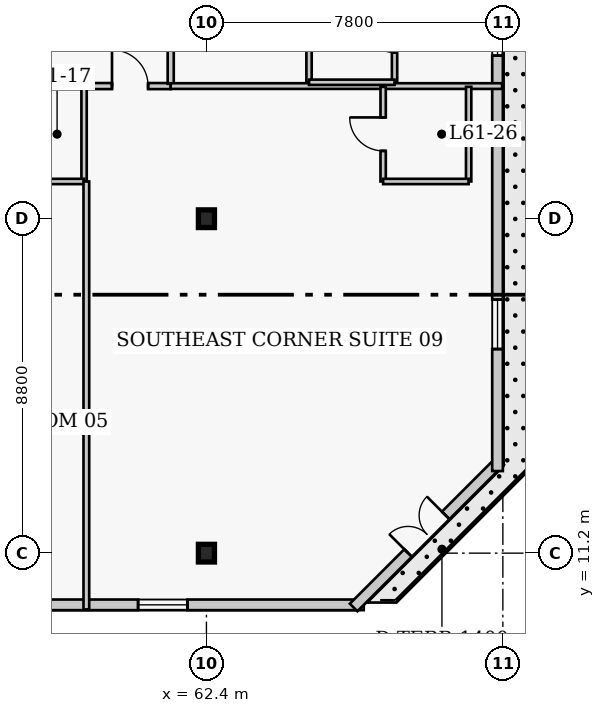
"""IFC4 building model, lengths in metres.
Left out: names, types, materials, properties, quantities, classifications, styles, units other than length and angle.
Written with IfcOpenShell. Run it as: python <this file> out.ifc"""

import sys

from ifc_helpers import new_model, si_unit, direction, frame, frame_2d, origin, origin_2d, place, context, subcontext, project, spatial, rectangle, i_section, extrude, element, fill, save


model = new_model("IFC4")
c1 = context("Model", 3, precision=1e-05, world=origin(), true_north=direction((0.0, 1.0)))
c2 = subcontext(c1, "Body", "Model", "MODEL_VIEW")
j1 = project(units=[si_unit("LENGTHUNIT", "METRE"), si_unit("PLANEANGLEUNIT", "RADIAN")], contexts=[c1])
p1 = place(None, origin())
s1 = spatial("IfcSite", under=j1, at=p1, CompositionType="ELEMENT")
p2 = place(p1, origin())
s2 = spatial("IfcBuilding", under=s1, at=p2, CompositionType="ELEMENT")
p3 = place(p2, frame((0.0, 0.0, 245.4)))
s3 = spatial("IfcBuildingStorey", under=s2, at=p3, CompositionType="ELEMENT", Elevation=245.4)
for number, where, z_axis, x_axis in (
    (1, (62.4, 11.2, 0.0), (0.0, 0.0, 1.0), (1.0, 0.0, 0.0)),
    (2, (62.4, 20.0, 0.0), (0.0, 0.0, 1.0), (1.0, 0.0, 0.0)),
):
    element("IfcColumn", number, at=place(p3, frame(where, z_axis=z_axis, x_axis=x_axis)), inside=s3, PredefinedType="COLUMN", context=c2, shape_type="SweptSolid", body=[
        extrude(i_section(OverallWidth=0.422, OverallDepth=0.465, WebThickness=0.045, FlangeThickness=0.073, FilletRadius=0.017, at=origin_2d()), origin(), (0.0, 0.0, 1.0), 4.0),
    ])
p4 = place(p3, frame((41.71, 9.84, 0.0), z_axis=(0.0, 0.0, 1.0), x_axis=(1.0, 0.0, 0.0)))
e3 = element("IfcWall", 3, at=p4, inside=s3, PredefinedType="SOLIDWALL", context=c2, shape_type="SweptSolid", body=[
    extrude(rectangle(XDim=24.83, YDim=0.28, at=frame_2d((12.415, 0.0))), origin(), (0.0, 0.0, 1.0), 3.76),
])
p5 = place(p4, frame((2.838, 0.0, 0.85)))
e4 = element("IfcOpeningElement", 4, at=p5, cuts=e3, PredefinedType="OPENING", context=c2, shape_type="SweptSolid", body=[
    extrude(rectangle(XDim=1.3, YDim=1.7, at=frame_2d((0.65, 0.85))), frame((0.0, 0.15, 0.0), z_axis=(0.0, -1.0, 0.0), x_axis=(1.0, 0.0, 0.0)), (0.0, 0.0, 1.0), 0.3),
])
p6 = place(p4, frame((10.615, 0.0, 0.85)))
e5 = element("IfcOpeningElement", 5, at=p6, cuts=e3, PredefinedType="OPENING", context=c2, shape_type="SweptSolid", body=[
    extrude(rectangle(XDim=1.3, YDim=1.7, at=frame_2d((0.65, 0.85))), frame((0.0, 0.15, 0.0), z_axis=(0.0, -1.0, 0.0), x_axis=(1.0, 0.0, 0.0)), (0.0, 0.0, 1.0), 0.3),
])
p7 = place(p4, frame((18.892, 0.0, 0.85)))
e6 = element("IfcOpeningElement", 6, at=p7, cuts=e3, PredefinedType="OPENING", context=c2, shape_type="SweptSolid", body=[
    extrude(rectangle(XDim=1.3, YDim=1.7, at=frame_2d((0.65, 0.85))), frame((0.0, 0.15, 0.0), z_axis=(0.0, -1.0, 0.0), x_axis=(1.0, 0.0, 0.0)), (0.0, 0.0, 1.0), 0.3),
])
p8 = place(p4, frame((14.365, 0.0, 0.85)))
e7 = element("IfcOpeningElement", 7, at=p8, cuts=e3, PredefinedType="OPENING", context=c2, shape_type="SweptSolid", body=[
    extrude(rectangle(XDim=1.3, YDim=1.7, at=frame_2d((0.65, 0.85))), frame((0.0, 0.15, 0.0), z_axis=(0.0, -1.0, 0.0), x_axis=(1.0, 0.0, 0.0)), (0.0, 0.0, 1.0), 0.3),
])
p9 = place(p3, frame((66.273, 9.771, 0.0), z_axis=(0.0, 0.0, 1.0), x_axis=(0.707129162587, 0.707084399077, 0.0)))
e8 = element("IfcWall", 8, at=p9, inside=s3, PredefinedType="SOLIDWALL", context=c2, shape_type="SweptSolid", body=[
    extrude(rectangle(XDim=5.454, YDim=0.28, at=frame_2d((2.727, 0.0))), origin(), (0.0, 0.0, 1.0), 3.76),
])
p10 = place(p9, frame((2.027, 0.0, 0.0)))
e9 = element("IfcOpeningElement", 9, at=p10, cuts=e8, PredefinedType="OPENING", context=c2, shape_type="SweptSolid", body=[
    extrude(rectangle(XDim=1.4, YDim=2.15, at=frame_2d((0.7, 1.075))), frame((0.0, 0.15, 0.0), z_axis=(0.0, -1.0, 0.0), x_axis=(1.0, 0.0, 0.0)), (0.0, 0.0, 1.0), 0.3),
])
p11 = place(p3, frame((70.06, 13.36, 0.0), z_axis=(0.0, 0.0, 1.0), x_axis=(0.0, 1.0, 0.0)))
e10 = element("IfcWall", 10, at=p11, inside=s3, PredefinedType="SOLIDWALL", context=c2, shape_type="SweptSolid", body=[
    extrude(rectangle(XDim=30.88, YDim=0.28, at=frame_2d((15.44, 0.0))), origin(), (0.0, 0.0, 1.0), 3.76),
])
p12 = place(p11, frame((3.21, 0.0, 0.85)))
e11 = element("IfcOpeningElement", 11, at=p12, cuts=e10, PredefinedType="OPENING", context=c2, shape_type="SweptSolid", body=[
    extrude(rectangle(XDim=1.3, YDim=1.7, at=frame_2d((0.65, 0.85))), frame((0.0, 0.15, 0.0), z_axis=(0.0, -1.0, 0.0), x_axis=(1.0, 0.0, 0.0)), (0.0, 0.0, 1.0), 0.3),
])
p13 = place(p11, frame((10.93, 0.0, 0.85)))
e12 = element("IfcOpeningElement", 12, at=p13, cuts=e10, PredefinedType="OPENING", context=c2, shape_type="SweptSolid", body=[
    extrude(rectangle(XDim=1.3, YDim=1.7, at=frame_2d((0.65, 0.85))), frame((0.0, 0.15, 0.0), z_axis=(0.0, -1.0, 0.0), x_axis=(1.0, 0.0, 0.0)), (0.0, 0.0, 1.0), 0.3),
])
p14 = place(p11, frame((18.65, 0.0, 0.85)))
e13 = element("IfcOpeningElement", 13, at=p14, cuts=e10, PredefinedType="OPENING", context=c2, shape_type="SweptSolid", body=[
    extrude(rectangle(XDim=1.3, YDim=1.7, at=frame_2d((0.65, 0.85))), frame((0.0, 0.15, 0.0), z_axis=(0.0, -1.0, 0.0), x_axis=(1.0, 0.0, 0.0)), (0.0, 0.0, 1.0), 0.3),
])
p15 = place(p11, frame((26.37, 0.0, 0.85)))
e14 = element("IfcOpeningElement", 14, at=p15, cuts=e10, PredefinedType="OPENING", context=c2, shape_type="SweptSolid", body=[
    extrude(rectangle(XDim=1.3, YDim=1.7, at=frame_2d((0.65, 0.85))), frame((0.0, 0.15, 0.0), z_axis=(0.0, -1.0, 0.0), x_axis=(1.0, 0.0, 0.0)), (0.0, 0.0, 1.0), 0.3),
])
p16 = place(p3, frame((35.8, 23.49, 0.0), z_axis=(0.0, 0.0, 1.0), x_axis=(1.0, 0.0, 0.0)))
e15 = element("IfcWall", 15, at=p16, inside=s3, PredefinedType="PARTITIONING", context=c2, shape_type="SweptSolid", body=[
    extrude(rectangle(XDim=25.66, YDim=0.16, at=frame_2d((12.83, 0.0))), origin(), (0.0, 0.0, 1.0), 3.76),
])
p17 = place(p16, frame((1.555, 0.0, 0.0)))
e16 = element("IfcOpeningElement", 16, at=p17, cuts=e15, PredefinedType="OPENING", context=c2, shape_type="SweptSolid", body=[
    extrude(rectangle(XDim=0.95, YDim=2.1, at=frame_2d((0.475, 1.05))), frame((0.0, 0.09, 0.0), z_axis=(0.0, -1.0, 0.0), x_axis=(1.0, 0.0, 0.0)), (0.0, 0.0, 1.0), 0.18),
])
p18 = place(p16, frame((10.57, 0.0, 0.0)))
e17 = element("IfcOpeningElement", 17, at=p18, cuts=e15, PredefinedType="OPENING", context=c2, shape_type="SweptSolid", body=[
    extrude(rectangle(XDim=0.95, YDim=2.1, at=frame_2d((0.475, 1.05))), frame((0.0, 0.09, 0.0), z_axis=(0.0, -1.0, 0.0), x_axis=(1.0, 0.0, 0.0)), (0.0, 0.0, 1.0), 0.18),
])
p19 = place(p16, frame((15.105, 0.0, 0.0)))
e18 = element("IfcOpeningElement", 18, at=p19, cuts=e15, PredefinedType="OPENING", context=c2, shape_type="SweptSolid", body=[
    extrude(rectangle(XDim=1.0, YDim=2.15, at=frame_2d((0.5, 1.075))), frame((0.0, 0.09, 0.0), z_axis=(0.0, -1.0, 0.0), x_axis=(1.0, 0.0, 0.0)), (0.0, 0.0, 1.0), 0.18),
])
p20 = place(p16, frame((19.285, 0.0, 0.0)))
e19 = element("IfcOpeningElement", 19, at=p20, cuts=e15, PredefinedType="OPENING", context=c2, shape_type="SweptSolid", body=[
    extrude(rectangle(XDim=0.95, YDim=2.1, at=frame_2d((0.475, 1.05))), frame((0.0, 0.09, 0.0), z_axis=(0.0, -1.0, 0.0), x_axis=(1.0, 0.0, 0.0)), (0.0, 0.0, 1.0), 0.18),
])
p21 = place(p16, frame((24.115, 0.0, 0.0)))
e20 = element("IfcOpeningElement", 20, at=p21, cuts=e15, PredefinedType="OPENING", context=c2, shape_type="SweptSolid", body=[
    extrude(rectangle(XDim=0.95, YDim=2.1, at=frame_2d((0.475, 1.05))), frame((0.0, 0.09, 0.0), z_axis=(0.0, -1.0, 0.0), x_axis=(1.0, 0.0, 0.0)), (0.0, 0.0, 1.0), 0.18),
])
p22 = place(p3, frame((61.46, 23.55, 0.0), z_axis=(0.0, 0.0, 1.0), x_axis=(0.0, 1.0, 0.0)))
e21 = element("IfcWall", 21, at=p22, inside=s3, PredefinedType="PARTITIONING", context=c2, shape_type="SweptSolid", body=[
    extrude(rectangle(XDim=17.1, YDim=0.16, at=frame_2d((8.55, 0.0))), origin(), (0.0, 0.0, 1.0), 3.76),
])
p23 = place(p22, frame((2.15, 0.0, 0.0)))
e22 = element("IfcOpeningElement", 22, at=p23, cuts=e21, PredefinedType="OPENING", context=c2, shape_type="SweptSolid", body=[
    extrude(rectangle(XDim=0.95, YDim=2.1, at=frame_2d((0.475, 1.05))), frame((0.0, 0.09, 0.0), z_axis=(0.0, -1.0, 0.0), x_axis=(1.0, 0.0, 0.0)), (0.0, 0.0, 1.0), 0.18),
])
p24 = place(p22, frame((8.825, 0.0, 0.0)))
e23 = element("IfcOpeningElement", 23, at=p24, cuts=e21, PredefinedType="OPENING", context=c2, shape_type="SweptSolid", body=[
    extrude(rectangle(XDim=0.95, YDim=2.1, at=frame_2d((0.475, 1.05))), frame((0.0, 0.09, 0.0), z_axis=(0.0, -1.0, 0.0), x_axis=(1.0, 0.0, 0.0)), (0.0, 0.0, 1.0), 0.18),
])
p25 = place(p22, frame((15.66, 0.0, 0.0)))
e24 = element("IfcOpeningElement", 24, at=p25, cuts=e21, PredefinedType="OPENING", context=c2, shape_type="SweptSolid", body=[
    extrude(rectangle(XDim=1.0, YDim=2.15, at=frame_2d((0.5, 1.075))), frame((0.0, 0.09, 0.0), z_axis=(0.0, -1.0, 0.0), x_axis=(1.0, 0.0, 0.0)), (0.0, 0.0, 1.0), 0.18),
])
p26 = place(p3, frame((59.18, 20.98, 0.0), z_axis=(0.0, 0.0, 1.0), x_axis=(0.0, 1.0, 0.0)))
e25 = element("IfcWall", 25, at=p26, inside=s3, PredefinedType="PLUMBINGWALL", context=c2, shape_type="SweptSolid", body=[
    extrude(rectangle(XDim=2.49, YDim=0.14, at=frame_2d((1.245, 0.0))), origin(), (0.0, 0.0, 1.0), 3.76),
])
p27 = place(p3, frame((56.93, 20.98, 0.0), z_axis=(0.0, 0.0, 1.0), x_axis=(1.0, 0.0, 0.0)))
e26 = element("IfcWall", 26, at=p27, inside=s3, PredefinedType="PLUMBINGWALL", context=c2, shape_type="SweptSolid", body=[
    extrude(rectangle(XDim=2.25, YDim=0.14, at=frame_2d((1.125, 0.0))), origin(), (0.0, 0.0, 1.0), 3.76),
])
p28 = place(p3, frame((59.24, 9.72, 0.0), z_axis=(0.0, 0.0, 1.0), x_axis=(0.0, 1.0, 0.0)))
e27 = element("IfcWall", 27, at=p28, inside=s3, PredefinedType="PARTITIONING", context=c2, shape_type="SweptSolid", body=[
    extrude(rectangle(XDim=11.26, YDim=0.15, at=frame_2d((5.63, 0.0))), origin(), (0.0, 0.0, 1.0), 3.76),
])
p29 = place(p3, frame((61.46, 23.49, 0.0), z_axis=(0.0, 0.0, 1.0), x_axis=(1.0, 0.0, 0.0)))
e28 = element("IfcWall", 28, at=p29, inside=s3, PredefinedType="PARTITIONING", context=c2, shape_type="SweptSolid", body=[
    extrude(rectangle(XDim=8.72, YDim=0.15, at=frame_2d((4.36, 0.0))), origin(), (0.0, 0.0, 1.0), 3.76),
])
p30 = place(p3, frame((67.05, 20.98, 0.0), z_axis=(0.0, 0.0, 1.0), x_axis=(0.0, 1.0, 0.0)))
e29 = element("IfcWall", 29, at=p30, inside=s3, PredefinedType="PLUMBINGWALL", context=c2, shape_type="SweptSolid", body=[
    extrude(rectangle(XDim=2.49, YDim=0.14, at=frame_2d((1.245, 0.0))), origin(), (0.0, 0.0, 1.0), 3.76),
])
p31 = place(p30, frame((0.805, 0.0, 0.0)))
e30 = element("IfcOpeningElement", 30, at=p31, cuts=e29, PredefinedType="OPENING", context=c2, shape_type="SweptSolid", body=[
    extrude(rectangle(XDim=0.88, YDim=2.05, at=frame_2d((0.44, 1.025))), frame((0.0, 0.08, 0.0), z_axis=(0.0, -1.0, 0.0), x_axis=(1.0, 0.0, 0.0)), (0.0, 0.0, 1.0), 0.16),
])
p32 = place(p3, frame((69.3, 20.98, 0.0), z_axis=(0.0, 0.0, 1.0), x_axis=(0.0, 1.0, 0.0)))
e31 = element("IfcWall", 31, at=p32, inside=s3, PredefinedType="PLUMBINGWALL", context=c2, shape_type="SweptSolid", body=[
    extrude(rectangle(XDim=2.49, YDim=0.14, at=frame_2d((1.245, 0.0))), origin(), (0.0, 0.0, 1.0), 3.76),
])
p33 = place(p3, frame((67.05, 20.98, 0.0), z_axis=(0.0, 0.0, 1.0), x_axis=(1.0, 0.0, 0.0)))
e32 = element("IfcWall", 32, at=p33, inside=s3, PredefinedType="PLUMBINGWALL", context=c2, shape_type="SweptSolid", body=[
    extrude(rectangle(XDim=2.25, YDim=0.14, at=frame_2d((1.125, 0.0))), origin(), (0.0, 0.0, 1.0), 3.76),
])
p34 = place(p3, frame((65.1, 23.59, 0.0), z_axis=(0.0, 0.0, 1.0), x_axis=(0.0, 1.0, 0.0)))
e33 = element("IfcWall", 33, at=p34, inside=s3, PredefinedType="PLUMBINGWALL", context=c2, shape_type="SweptSolid", body=[
    extrude(rectangle(XDim=2.45, YDim=0.14, at=frame_2d((1.225, 0.0))), origin(), (0.0, 0.0, 1.0), 3.76),
])
p35 = place(p3, frame((67.35, 23.59, 0.0), z_axis=(0.0, 0.0, 1.0), x_axis=(0.0, 1.0, 0.0)))
e34 = element("IfcWall", 34, at=p35, inside=s3, PredefinedType="PLUMBINGWALL", context=c2, shape_type="SweptSolid", body=[
    extrude(rectangle(XDim=2.45, YDim=0.14, at=frame_2d((1.225, 0.0))), origin(), (0.0, 0.0, 1.0), 3.76),
])
p36 = place(p35, frame((0.785, 0.0, 0.0)))
e35 = element("IfcOpeningElement", 35, at=p36, cuts=e34, PredefinedType="OPENING", context=c2, shape_type="SweptSolid", body=[
    extrude(rectangle(XDim=0.88, YDim=2.05, at=frame_2d((0.44, 1.025))), frame((0.0, 0.08, 0.0), z_axis=(0.0, -1.0, 0.0), x_axis=(1.0, 0.0, 0.0)), (0.0, 0.0, 1.0), 0.16),
])
p37 = place(p3, frame((65.1, 23.59, 0.0), z_axis=(0.0, 0.0, 1.0), x_axis=(1.0, 0.0, 0.0)))
e36 = element("IfcWall", 36, at=p37, inside=s3, PredefinedType="PLUMBINGWALL", context=c2, shape_type="SweptSolid", body=[
    extrude(rectangle(XDim=2.25, YDim=0.14, at=frame_2d((1.125, 0.0))), origin(), (0.0, 0.0, 1.0), 3.76),
])
p38 = place(p7, origin())
e37 = element("IfcWindow", 37, at=p38, inside=s3, PartitioningType="SINGLE_PANEL", PredefinedType="WINDOW", context=c2, shape_type="SweptSolid", body=[
    extrude(rectangle(XDim=1.3, YDim=1.7, at=frame_2d((0.65, 0.85))), frame((0.0, 0.03, 0.0), z_axis=(0.0, -1.0, 0.0), x_axis=(1.0, 0.0, 0.0)), (0.0, 0.0, 1.0), 0.06),
])
fill(e6, e37)
p39 = place(p10, origin())
e38 = element("IfcDoor", 38, at=p39, inside=s3, OperationType="DOUBLE_DOOR_SINGLE_SWING", PredefinedType="DOOR", context=c2, shape_type="SweptSolid", body=[
    extrude(rectangle(XDim=1.4, YDim=2.15, at=frame_2d((0.7, 1.075))), frame((0.0, 0.025, 0.0), z_axis=(0.0, -1.0, 0.0), x_axis=(1.0, 0.0, 0.0)), (0.0, 0.0, 1.0), 0.05),
])
fill(e9, e38)
p40 = place(p12, origin())
e39 = element("IfcWindow", 39, at=p40, inside=s3, PartitioningType="SINGLE_PANEL", PredefinedType="WINDOW", context=c2, shape_type="SweptSolid", body=[
    extrude(rectangle(XDim=1.3, YDim=1.7, at=frame_2d((0.65, 0.85))), frame((0.0, 0.03, 0.0), z_axis=(0.0, -1.0, 0.0), x_axis=(1.0, 0.0, 0.0)), (0.0, 0.0, 1.0), 0.06),
])
fill(e11, e39)
p41 = place(p13, origin())
e40 = element("IfcWindow", 40, at=p41, inside=s3, PartitioningType="SINGLE_PANEL", PredefinedType="WINDOW", context=c2, shape_type="SweptSolid", body=[
    extrude(rectangle(XDim=1.3, YDim=1.7, at=frame_2d((0.65, 0.85))), frame((0.0, 0.03, 0.0), z_axis=(0.0, -1.0, 0.0), x_axis=(1.0, 0.0, 0.0)), (0.0, 0.0, 1.0), 0.06),
])
fill(e12, e40)
p42 = place(p31, origin())
e41 = element("IfcDoor", 41, at=p42, inside=s3, OperationType="SINGLE_SWING_RIGHT", PredefinedType="DOOR", context=c2, shape_type="SweptSolid", body=[
    extrude(rectangle(XDim=0.88, YDim=2.05, at=frame_2d((0.44, 1.025))), frame((0.0, 0.025, 0.0), z_axis=(0.0, -1.0, 0.0), x_axis=(1.0, 0.0, 0.0)), (0.0, 0.0, 1.0), 0.05),
])
fill(e30, e41)
p43 = place(p21, origin())
e42 = element("IfcDoor", 42, at=p43, inside=s3, OperationType="SINGLE_SWING_LEFT", PredefinedType="DOOR", context=c2, shape_type="SweptSolid", body=[
    extrude(rectangle(XDim=0.95, YDim=2.1, at=frame_2d((0.475, 1.05))), frame((0.0, 0.025, 0.0), z_axis=(0.0, -1.0, 0.0), x_axis=(1.0, 0.0, 0.0)), (0.0, 0.0, 1.0), 0.05),
])
fill(e20, e42)
p44 = place(p36, origin())
e43 = element("IfcDoor", 43, at=p44, inside=s3, OperationType="SINGLE_SWING_RIGHT", PredefinedType="DOOR", context=c2, shape_type="SweptSolid", body=[
    extrude(rectangle(XDim=0.88, YDim=2.05, at=frame_2d((0.44, 1.025))), frame((0.0, 0.025, 0.0), z_axis=(0.0, -1.0, 0.0), x_axis=(1.0, 0.0, 0.0)), (0.0, 0.0, 1.0), 0.05),
])
fill(e35, e43)
save(model, sys.argv[1])
